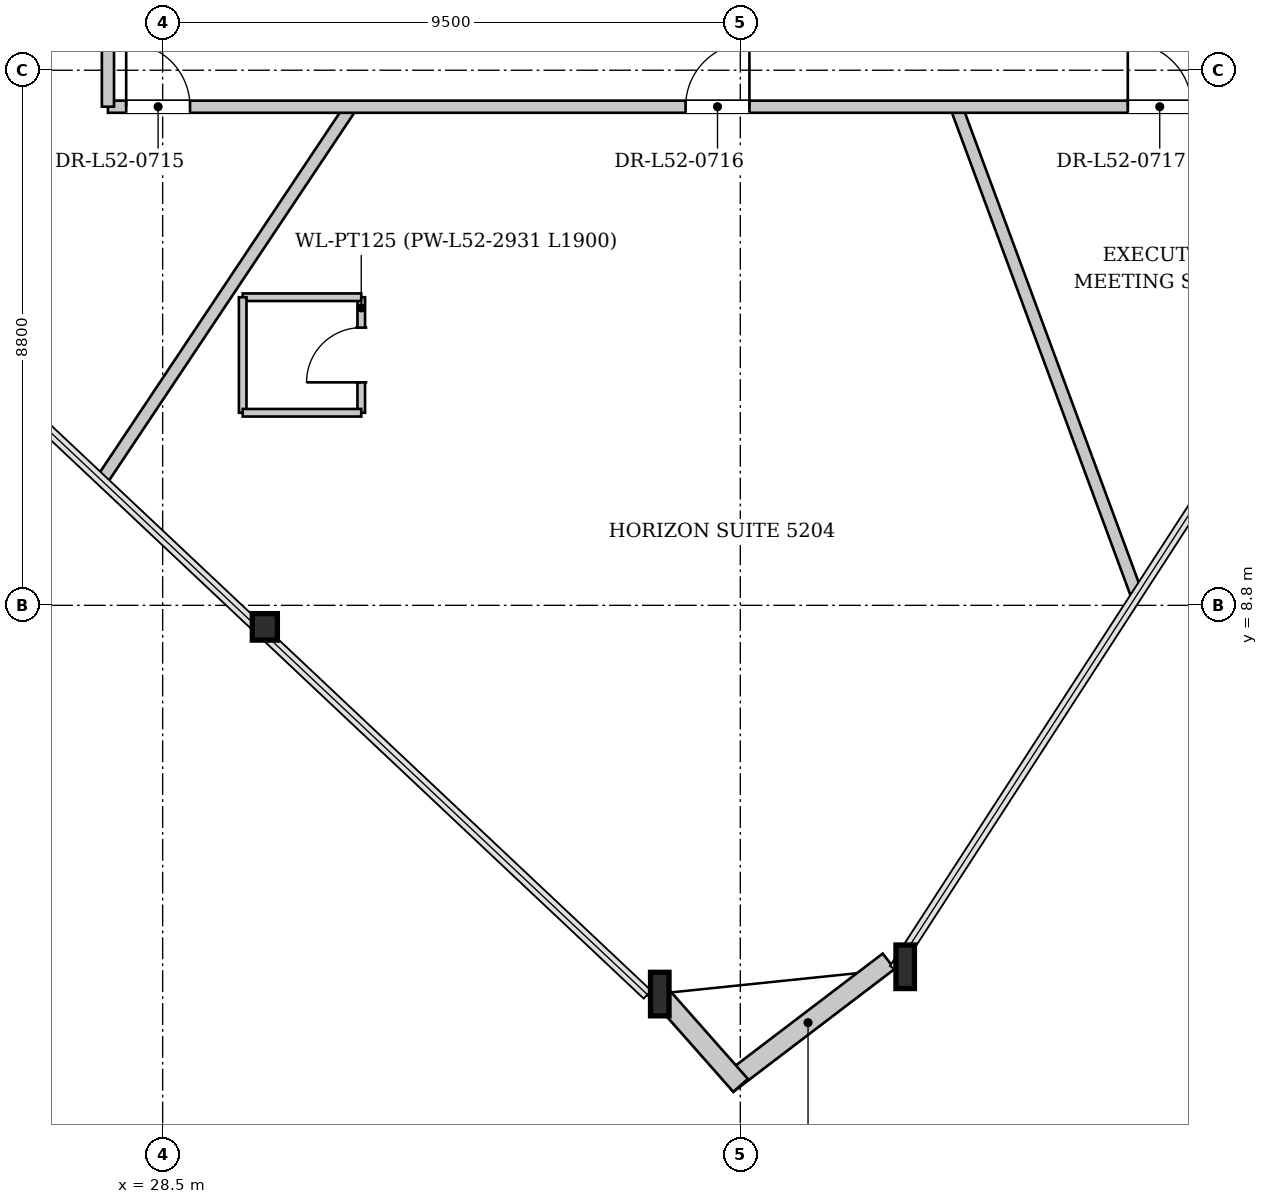
"""IFC4 building model, lengths in metres.
Left out: names, types, materials, properties, quantities, classifications, styles, units other than length and angle.
Written with IfcOpenShell. Run it as: python <this file> out.ifc"""

import sys

from ifc_helpers import new_model, si_unit, direction, frame, frame_2d, origin, origin_2d, place, context, subcontext, project, spatial, rectangle, i_section, extrude, source, transform, mapped, element, fill, save


model = new_model("IFC4")
c1 = context("Model", 3, precision=1e-05, world=origin(), true_north=direction((0.0, 1.0)))
c2 = subcontext(c1, "Body", "Model", "MODEL_VIEW")
j1 = project(units=[si_unit("LENGTHUNIT", "METRE"), si_unit("PLANEANGLEUNIT", "RADIAN")], contexts=[c1])
p1 = place(None, origin())
s1 = spatial("IfcSite", under=j1, at=p1, CompositionType="ELEMENT")
p2 = place(p1, origin())
s2 = spatial("IfcBuilding", under=s1, at=p2, CompositionType="ELEMENT")
p3 = place(p2, frame((0.0, 0.0, 196.3)))
s3 = spatial("IfcBuildingStorey", under=s2, at=p3, CompositionType="ELEMENT", Elevation=196.3)
m1 = source(origin(), c2, "Body", "SweptSolid", [
    extrude(i_section(OverallWidth=0.412, OverallDepth=0.435, WebThickness=0.031, FlangeThickness=0.05, at=origin_2d()), origin(), (0.0, 0.0, 1.0), 3.85),
])
p4 = place(p3, frame((30.013, 8.483, 0.0), z_axis=(0.087059297295, -0.01940287325, 0.996014160172), x_axis=(0.217532582866, 0.976053059722, 0.0)))
e1 = element("IfcColumn", 1, at=p4, inside=s3, PredefinedType="COLUMN", context=c2, shape_type="MappedRepresentation", body=[
    mapped(m1, transform((0.0, 0.0, 0.0), x_axis=(1.0, 0.0, 0.0), y_axis=(0.0, 1.0, 0.0), z_axis=(0.0, 0.0, 1.0), scale=1.0)),
])
m2 = source(origin(), c2, "Body", "SweptSolid", [
    extrude(i_section(OverallWidth=0.304, OverallDepth=0.716, WebThickness=0.021, FlangeThickness=0.04, at=origin_2d()), origin(), (0.0, 0.0, 1.0), 3.856),
])
p5 = place(p3, frame((36.472, 2.399, 0.0), z_axis=(0.105530824628, 0.003988267517, 0.994408034348), x_axis=(-0.037765481508, 0.999286629755, 0.0)))
e2 = element("IfcColumn", 2, at=p5, inside=s3, PredefinedType="COLUMN", context=c2, shape_type="MappedRepresentation", body=[
    mapped(m2, transform((0.0, 0.0, 0.0), x_axis=(1.0, 0.0, 0.0), y_axis=(0.0, 1.0, 0.0), z_axis=(0.0, 0.0, 1.0), scale=1.0)),
])
m3 = source(origin(), c2, "Body", "SweptSolid", [
    extrude(i_section(OverallWidth=0.304, OverallDepth=0.716, WebThickness=0.021, FlangeThickness=0.04, at=origin_2d()), origin(), (0.0, 0.0, 1.0), 3.852),
])
p6 = place(p3, frame((40.537, 2.819, 0.0), z_axis=(0.090645001599, 0.019079822015, 0.995700479099), x_axis=(-0.20597599337, 0.978557044916, 0.0)))
e3 = element("IfcColumn", 3, at=p6, inside=s3, PredefinedType="COLUMN", context=c2, shape_type="MappedRepresentation", body=[
    mapped(m3, transform((0.0, 0.0, 0.0), x_axis=(1.0, 0.0, 0.0), y_axis=(0.0, 1.0, 0.0), z_axis=(0.0, 0.0, 1.0), scale=1.0)),
])
p7 = place(p3, frame((40.44, 2.947, 0.0), z_axis=(0.0, 0.0, 1.0), x_axis=(-0.795619968994, -0.605796058866, 0.0)))
e4 = element("IfcWall", 4, at=p7, inside=s3, PredefinedType="SOLIDWALL", context=c2, shape_type="SweptSolid", body=[
    extrude(rectangle(XDim=3.334, YDim=0.32, at=frame_2d((1.667, 0.0))), origin(), (0.0, 0.0, 1.0), 3.172),
])
p8 = place(p3, frame((38.005, 0.906, 0.0), z_axis=(0.0, 0.0, 1.0), x_axis=(-0.662045382333, 0.749463749444, 0.0)))
e5 = element("IfcWall", 5, at=p8, inside=s3, PredefinedType="SOLIDWALL", context=c2, shape_type="SweptSolid", body=[
    extrude(rectangle(XDim=2.134, YDim=0.32, at=frame_2d((1.067, 0.0))), origin(), (0.0, 0.0, 1.0), 3.172),
])
p9 = place(p3, frame((31.598, 17.0, 0.0), z_axis=(0.0, 0.0, 1.0), x_axis=(-0.554845645731, -0.831953309635, 0.0)))
e6 = element("IfcWall", 6, at=p9, inside=s3, PredefinedType="PARTITIONING", context=c2, shape_type="SweptSolid", body=[
    extrude(rectangle(XDim=7.359, YDim=0.2, at=frame_2d((3.68, 0.0))), origin(), (0.0, 0.0, 1.0), 3.78),
])
p10 = place(p3, frame((41.551, 17.0, 0.0), z_axis=(0.0, 0.0, 1.0), x_axis=(0.346945907762, -0.937885140669, 0.0)))
e7 = element("IfcWall", 7, at=p10, inside=s3, PredefinedType="PARTITIONING", context=c2, shape_type="SweptSolid", body=[
    extrude(rectangle(XDim=8.525, YDim=0.2, at=frame_2d((4.263, 0.0))), origin(), (0.0, 0.0, 1.0), 3.78),
])
p11 = place(p3, frame((31.766, 11.967, 0.0), z_axis=(0.0, 0.0, 1.0), x_axis=(0.0, 1.0, 0.0)))
e8 = element("IfcWall", 8, at=p11, inside=s3, PredefinedType="PARTITIONING", context=c2, shape_type="SweptSolid", body=[
    extrude(rectangle(XDim=1.9, YDim=0.125, at=frame_2d((0.95, 0.0))), origin(), (0.0, 0.0, 1.0), 3.78),
])
p12 = place(p11, frame((0.5, 0.0, 0.0)))
e9 = element("IfcOpeningElement", 9, at=p12, cuts=e8, PredefinedType="OPENING", context=c2, shape_type="SweptSolid", body=[
    extrude(rectangle(XDim=0.9, YDim=2.1, at=frame_2d((0.45, 1.05))), frame((0.0, 0.073, 0.0), z_axis=(0.0, -1.0, 0.0), x_axis=(1.0, 0.0, 0.0)), (0.0, 0.0, 1.0), 0.145),
])
p13 = place(p3, frame((31.766, 13.867, 0.0), z_axis=(0.0, 0.0, 1.0), x_axis=(-1.0, 0.0, 0.0)))
e10 = element("IfcWall", 10, at=p13, inside=s3, PredefinedType="PARTITIONING", context=c2, shape_type="SweptSolid", body=[
    extrude(rectangle(XDim=1.95, YDim=0.125, at=frame_2d((0.975, 0.0))), origin(), (0.0, 0.0, 1.0), 3.78),
])
p14 = place(p3, frame((29.816, 13.867, 0.0), z_axis=(0.0, 0.0, 1.0), x_axis=(0.0, -1.0, 0.0)))
e11 = element("IfcWall", 11, at=p14, inside=s3, PredefinedType="PARTITIONING", context=c2, shape_type="SweptSolid", body=[
    extrude(rectangle(XDim=1.9, YDim=0.125, at=frame_2d((0.95, 0.0))), origin(), (0.0, 0.0, 1.0), 3.78),
])
p15 = place(p3, frame((29.816, 11.967, 0.0), z_axis=(0.0, 0.0, 1.0), x_axis=(1.0, 0.0, 0.0)))
e12 = element("IfcWall", 12, at=p15, inside=s3, PredefinedType="PARTITIONING", context=c2, shape_type="SweptSolid", body=[
    extrude(rectangle(XDim=1.95, YDim=0.125, at=frame_2d((0.975, 0.0))), origin(), (0.0, 0.0, 1.0), 3.78),
])
p16 = place(p3, frame((27.6, 17.0, 0.0), z_axis=(0.0, 0.0, 1.0), x_axis=(1.0, 0.0, 0.0)))
e13 = element("IfcWall", 13, at=p16, inside=s3, PredefinedType="PARTITIONING", context=c2, shape_type="SweptSolid", body=[
    extrude(rectangle(XDim=20.8, YDim=0.2, at=frame_2d((10.4, 0.0))), origin(), (0.0, 0.0, 1.0), 3.78),
])
p17 = place(p16, frame((0.3, 0.0, 0.0)))
e14 = element("IfcOpeningElement", 14, at=p17, cuts=e13, PredefinedType="OPENING", context=c2, shape_type="SweptSolid", body=[
    extrude(rectangle(XDim=1.05, YDim=2.2, at=frame_2d((0.525, 1.1))), frame((0.0, 0.11, 0.0), z_axis=(0.0, -1.0, 0.0), x_axis=(1.0, 0.0, 0.0)), (0.0, 0.0, 1.0), 0.22),
])
p18 = place(p16, frame((9.5, 0.0, 0.0)))
e15 = element("IfcOpeningElement", 15, at=p18, cuts=e13, PredefinedType="OPENING", context=c2, shape_type="SweptSolid", body=[
    extrude(rectangle(XDim=1.05, YDim=2.2, at=frame_2d((0.525, 1.1))), frame((0.0, 0.11, 0.0), z_axis=(0.0, -1.0, 0.0), x_axis=(1.0, 0.0, 0.0)), (0.0, 0.0, 1.0), 0.22),
])
p19 = place(p16, frame((16.773, 0.0, 0.0)))
e16 = element("IfcOpeningElement", 16, at=p19, cuts=e13, PredefinedType="OPENING", context=c2, shape_type="SweptSolid", body=[
    extrude(rectangle(XDim=1.05, YDim=2.2, at=frame_2d((0.525, 1.1))), frame((0.0, 0.11, 0.0), z_axis=(0.0, -1.0, 0.0), x_axis=(1.0, 0.0, 0.0)), (0.0, 0.0, 1.0), 0.22),
])
p20 = place(p3, frame((27.6, 17.0, 0.0), z_axis=(0.0, 0.0, 1.0), x_axis=(0.0, 1.0, 0.0)))
e17 = element("IfcWall", 17, at=p20, inside=s3, PredefinedType="PARTITIONING", context=c2, shape_type="SweptSolid", body=[
    extrude(rectangle(XDim=19.2, YDim=0.2, at=frame_2d((9.6, 0.0))), origin(), (0.0, 0.0, 1.0), 3.78),
])
p21 = place(p20, frame((14.326, 0.0, 0.0)))
e18 = element("IfcOpeningElement", 18, at=p21, cuts=e17, PredefinedType="OPENING", context=c2, shape_type="SweptSolid", body=[
    extrude(rectangle(XDim=1.05, YDim=2.2, at=frame_2d((0.525, 1.1))), frame((0.0, 0.11, 0.0), z_axis=(0.0, -1.0, 0.0), x_axis=(1.0, 0.0, 0.0)), (0.0, 0.0, 1.0), 0.22),
])
m4 = source(origin(), c2, "Body", "SweptSolid", [
    extrude(rectangle(XDim=0.9, YDim=2.1, at=frame_2d((0.45, 1.05))), frame((0.0, 0.025, 0.0), z_axis=(0.0, -1.0, 0.0), x_axis=(1.0, 0.0, 0.0)), (0.0, 0.0, 1.0), 0.05),
])
p22 = place(p12, origin())
e19 = element("IfcDoor", 19, at=p22, inside=s3, OperationType="SINGLE_SWING_LEFT", PredefinedType="DOOR", context=c2, shape_type="MappedRepresentation", body=[
    mapped(m4, transform((0.0, 0.0, 0.0), x_axis=(1.0, 0.0, 0.0), y_axis=(0.0, 1.0, 0.0), z_axis=(0.0, 0.0, 1.0), scale=1.0)),
])
fill(e9, e19)
m5 = source(origin(), c2, "Body", "SweptSolid", [
    extrude(rectangle(XDim=1.05, YDim=2.2, at=frame_2d((0.525, 1.1))), frame((0.0, 0.025, 0.0), z_axis=(0.0, -1.0, 0.0), x_axis=(1.0, 0.0, 0.0)), (0.0, 0.0, 1.0), 0.05),
])
p23 = place(p17, origin())
e20 = element("IfcDoor", 20, at=p23, inside=s3, OperationType="SINGLE_SWING_LEFT", PredefinedType="DOOR", context=c2, shape_type="MappedRepresentation", body=[
    mapped(m5, transform((0.0, 0.0, 0.0), x_axis=(1.0, 0.0, 0.0), y_axis=(0.0, 1.0, 0.0), z_axis=(0.0, 0.0, 1.0), scale=1.0)),
])
fill(e14, e20)
p24 = place(p18, origin())
e21 = element("IfcDoor", 21, at=p24, inside=s3, OperationType="SINGLE_SWING_RIGHT", PredefinedType="DOOR", context=c2, shape_type="MappedRepresentation", body=[
    mapped(m5, transform((0.0, 0.0, 0.0), x_axis=(1.0, 0.0, 0.0), y_axis=(0.0, 1.0, 0.0), z_axis=(0.0, 0.0, 1.0), scale=1.0)),
])
fill(e15, e21)
p25 = place(p19, origin())
e22 = element("IfcDoor", 22, at=p25, inside=s3, OperationType="SINGLE_SWING_LEFT", PredefinedType="DOOR", context=c2, shape_type="MappedRepresentation", body=[
    mapped(m5, transform((0.0, 0.0, 0.0), x_axis=(1.0, 0.0, 0.0), y_axis=(0.0, 1.0, 0.0), z_axis=(0.0, 0.0, 1.0), scale=1.0)),
])
fill(e16, e22)
save(model, sys.argv[1])
